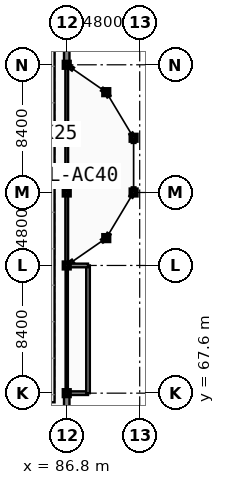
"""IFC4 building model, lengths in metres.
Left out: names, types, materials, properties, quantities, classifications, styles, units other than length and angle.
Written with IfcOpenShell. Run it as: python <this file> out.ifc"""

import sys

from ifc_helpers import new_model, si_unit, direction, frame, frame_2d, origin, origin_2d, place, context, subcontext, project, spatial, rectangle, extrude, element, fill, save


model = new_model("IFC4")
c1 = context("Model", 3, precision=1e-05, world=origin(), true_north=direction((0.0, 1.0)))
c2 = subcontext(c1, "Body", "Model", "MODEL_VIEW")
j1 = project(units=[si_unit("LENGTHUNIT", "METRE"), si_unit("PLANEANGLEUNIT", "RADIAN")], contexts=[c1])
p1 = place(None, origin())
s1 = spatial("IfcSite", under=j1, at=p1, CompositionType="ELEMENT")
p2 = place(p1, origin())
s2 = spatial("IfcBuilding", under=s1, at=p2, CompositionType="ELEMENT")
p3 = place(p2, frame((0.0, 0.0, 13.8)))
s3 = spatial("IfcBuildingStorey", under=s2, at=p3, CompositionType="ELEMENT", Elevation=13.8)
for number, where, z_axis, x_axis in (
    (1, (86.8, 67.6, 0.0), (0.0, 0.0, 1.0), (1.0, 0.0, 0.0)),
    (2, (86.8, 76.0, 0.0), (0.0, 0.0, 1.0), (1.0, 0.0, 0.0)),
    (3, (86.8, 80.8, 0.0), (0.0, 0.0, 1.0), (1.0, 0.0, 0.0)),
    (4, (86.8, 89.2, 0.0), (0.0, 0.0, 1.0), (1.0, 0.0, 0.0)),
    (5, (89.4, 77.8, 0.0), (0.0, 0.0, 1.0), (1.0, 0.0, 0.0)),
    (6, (89.4, 87.4, 0.0), (0.0, 0.0, 1.0), (1.0, 0.0, 0.0)),
    (7, (91.2, 80.8, 0.0), (0.0, 0.0, 1.0), (1.0, 0.0, 0.0)),
    (8, (91.2, 84.4, 0.0), (0.0, 0.0, 1.0), (1.0, 0.0, 0.0)),
):
    element("IfcColumn", number, at=place(p3, frame(where, z_axis=z_axis, x_axis=x_axis)), inside=s3, PredefinedType="COLUMN", context=c2, shape_type="SweptSolid", body=[
        extrude(rectangle(XDim=0.36, YDim=0.36, at=origin_2d()), origin(), (0.0, 0.0, 1.0), 3.9),
    ])
p4 = place(p3, frame((86.8, 67.6, 0.0), z_axis=(0.0, 0.0, 1.0), x_axis=(0.0, 1.0, 0.0)))
e9 = element("IfcWall", 9, at=p4, inside=s3, PredefinedType="PARTITIONING", context=c2, shape_type="SweptSolid", body=[
    extrude(rectangle(XDim=8.4, YDim=0.15, at=frame_2d((4.2, 0.0))), origin(), (0.0, 0.0, 1.0), 3.2),
])
p5 = place(p4, frame((3.7, 0.0, -0.01)))
e10 = element("IfcOpeningElement", 10, at=p5, cuts=e9, PredefinedType="OPENING", context=c2, shape_type="SweptSolid", body=[
    extrude(rectangle(XDim=1.0, YDim=2.16, at=frame_2d((0.5, 1.08))), frame((0.0, 0.085, 0.0), z_axis=(0.0, -1.0, 0.0), x_axis=(1.0, 0.0, 0.0)), (0.0, 0.0, 1.0), 0.17),
])
p6 = place(p3, frame((86.8, 76.0, 0.0), z_axis=(0.0, 0.0, 1.0), x_axis=(0.0, 1.0, 0.0)))
e11 = element("IfcWall", 11, at=p6, inside=s3, PredefinedType="PARTITIONING", context=c2, shape_type="SweptSolid", body=[
    extrude(rectangle(XDim=13.2, YDim=0.18, at=frame_2d((6.6, 0.0))), origin(), (0.0, 0.0, 1.0), 3.2),
])
p7 = place(p6, frame((5.8, 0.0, -0.01)))
e12 = element("IfcOpeningElement", 12, at=p7, cuts=e11, PredefinedType="OPENING", context=c2, shape_type="SweptSolid", body=[
    extrude(rectangle(XDim=1.6, YDim=2.21, at=frame_2d((0.8, 1.105))), frame((0.0, 0.1, 0.0), z_axis=(0.0, -1.0, 0.0), x_axis=(1.0, 0.0, 0.0)), (0.0, 0.0, 1.0), 0.2),
])
p8 = place(p3, frame((86.8, 59.2, 0.0), z_axis=(0.0, 0.0, 1.0), x_axis=(0.0, 1.0, 0.0)))
e13 = element("IfcWall", 13, at=p8, inside=s3, PredefinedType="SOLIDWALL", context=c2, shape_type="SweptSolid", body=[
    extrude(rectangle(XDim=8.4, YDim=0.36, at=frame_2d((4.2, 0.0))), origin(), (0.0, 0.0, 1.0), 3.2),
])
p9 = place(p8, frame((0.46, 0.0, 0.75)))
e14 = element("IfcOpeningElement", 14, at=p9, cuts=e13, PredefinedType="OPENING", context=c2, shape_type="SweptSolid", body=[
    extrude(rectangle(XDim=1.55, YDim=2.31, at=frame_2d((0.775, 1.155))), frame((0.0, 0.19, 0.0), z_axis=(0.0, -1.0, 0.0), x_axis=(1.0, 0.0, 0.0)), (0.0, 0.0, 1.0), 0.38),
])
p10 = place(p8, frame((6.26, 0.0, 0.75)))
e15 = element("IfcOpeningElement", 15, at=p10, cuts=e13, PredefinedType="OPENING", context=c2, shape_type="SweptSolid", body=[
    extrude(rectangle(XDim=1.55, YDim=2.31, at=frame_2d((0.775, 1.155))), frame((0.0, 0.19, 0.0), z_axis=(0.0, -1.0, 0.0), x_axis=(1.0, 0.0, 0.0)), (0.0, 0.0, 1.0), 0.38),
])
p11 = place(p3, frame((86.8, 89.2, 0.0), z_axis=(0.0, 0.0, 1.0), x_axis=(0.0, 1.0, 0.0)))
e16 = element("IfcWall", 16, at=p11, inside=s3, PredefinedType="SOLIDWALL", context=c2, shape_type="SweptSolid", body=[
    extrude(rectangle(XDim=8.4, YDim=0.36, at=frame_2d((4.2, 0.0))), origin(), (0.0, 0.0, 1.0), 3.2),
])
p12 = place(p11, frame((0.46, 0.0, 0.75)))
e17 = element("IfcOpeningElement", 17, at=p12, cuts=e16, PredefinedType="OPENING", context=c2, shape_type="SweptSolid", body=[
    extrude(rectangle(XDim=1.55, YDim=2.31, at=frame_2d((0.775, 1.155))), frame((0.0, 0.19, 0.0), z_axis=(0.0, -1.0, 0.0), x_axis=(1.0, 0.0, 0.0)), (0.0, 0.0, 1.0), 0.38),
])
p13 = place(p11, frame((6.26, 0.0, 0.75)))
e18 = element("IfcOpeningElement", 18, at=p13, cuts=e16, PredefinedType="OPENING", context=c2, shape_type="SweptSolid", body=[
    extrude(rectangle(XDim=1.55, YDim=2.31, at=frame_2d((0.775, 1.155))), frame((0.0, 0.19, 0.0), z_axis=(0.0, -1.0, 0.0), x_axis=(1.0, 0.0, 0.0)), (0.0, 0.0, 1.0), 0.38),
])
p14 = place(p3, frame((87.03, 76.159, 0.0), z_axis=(0.0, 0.0, 1.0), x_axis=(0.822192191644, 0.56920997883, 0.0)))
e19 = element("IfcWall", 19, at=p14, inside=s3, PredefinedType="SOLIDWALL", context=c2, shape_type="SweptSolid", body=[
    extrude(rectangle(XDim=0.22, YDim=0.24, at=frame_2d((0.11, 0.0))), origin(), (0.0, 0.0, 1.0), 3.2),
])
p15 = place(p3, frame((89.121, 77.606, 0.0), z_axis=(0.0, 0.0, 1.0), x_axis=(0.821855834467, 0.569695521619, 0.0)))
e20 = element("IfcWall", 20, at=p15, inside=s3, PredefinedType="SOLIDWALL", context=c2, shape_type="SweptSolid", body=[
    extrude(rectangle(XDim=0.34, YDim=0.24, at=frame_2d((0.17, 0.0))), origin(), (0.0, 0.0, 1.0), 3.2),
])
p16 = place(p3, frame((89.4, 77.8, 0.0), z_axis=(0.0, 0.0, 1.0), x_axis=(0.514812489021, 0.857302805984, 0.0)))
e21 = element("IfcWall", 21, at=p16, inside=s3, PredefinedType="SOLIDWALL", context=c2, shape_type="SweptSolid", body=[
    extrude(rectangle(XDim=0.34, YDim=0.24, at=frame_2d((0.17, 0.0))), origin(), (0.0, 0.0, 1.0), 3.2),
])
for number, where, z_axis, x_axis in (
    (22, (91.025, 80.509, 0.0), (0.0, 0.0, 1.0), (0.514, 0.858, 0.0)),
    (23, (91.2, 80.8, 0.0), (0.0, 0.0, 1.0), (0.0, 1.0, 0.0)),
    (24, (91.2, 84.06, 0.0), (0.0, 0.0, 1.0), (0.0, 1.0, 0.0)),
    (25, (91.2, 84.4, 0.0), (0.0, 0.0, 1.0), (-0.514, 0.858, 0.0)),
):
    element("IfcWall", number, at=place(p3, frame(where, z_axis=z_axis, x_axis=x_axis)), inside=s3, PredefinedType="SOLIDWALL", context=c2, shape_type="SweptSolid", body=[
        extrude(rectangle(XDim=0.34, YDim=0.24, at=frame_2d((0.17, 0.0))), origin(), (0.0, 0.0, 1.0), 3.2),
    ])
p17 = place(p3, frame((89.575, 87.108, 0.0), z_axis=(0.0, 0.0, 1.0), x_axis=(-0.514812489021, 0.857302805984, 0.0)))
e26 = element("IfcWall", 26, at=p17, inside=s3, PredefinedType="SOLIDWALL", context=c2, shape_type="SweptSolid", body=[
    extrude(rectangle(XDim=0.34, YDim=0.24, at=frame_2d((0.17, 0.0))), origin(), (0.0, 0.0, 1.0), 3.2),
])
p18 = place(p3, frame((89.4, 87.4, 0.0), z_axis=(0.0, 0.0, 1.0), x_axis=(-0.821855834467, 0.569695521619, 0.0)))
e27 = element("IfcWall", 27, at=p18, inside=s3, PredefinedType="SOLIDWALL", context=c2, shape_type="SweptSolid", body=[
    extrude(rectangle(XDim=0.34, YDim=0.24, at=frame_2d((0.17, 0.0))), origin(), (0.0, 0.0, 1.0), 3.2),
])
p19 = place(p3, frame((87.211, 88.915, 0.0), z_axis=(0.0, 0.0, 1.0), x_axis=(-0.822192191644, 0.56920997883, 0.0)))
e28 = element("IfcWall", 28, at=p19, inside=s3, PredefinedType="SOLIDWALL", context=c2, shape_type="SweptSolid", body=[
    extrude(rectangle(XDim=0.22, YDim=0.24, at=frame_2d((0.11, 0.0))), origin(), (0.0, 0.0, 1.0), 3.2),
])
p20 = place(p3, frame((86.8, 67.6, 0.0), z_axis=(0.0, 0.0, 1.0), x_axis=(1.0, 0.0, 0.0)))
e29 = element("IfcWall", 29, at=p20, inside=s3, PredefinedType="SOLIDWALL", context=c2, shape_type="SweptSolid", body=[
    extrude(rectangle(XDim=1.4, YDim=0.24, at=frame_2d((0.7, 0.0))), origin(), (0.0, 0.0, 1.0), 3.2),
])
p21 = place(p3, frame((88.2, 67.6, 0.0), z_axis=(0.0, 0.0, 1.0), x_axis=(0.0, 1.0, 0.0)))
e30 = element("IfcWall", 30, at=p21, inside=s3, PredefinedType="SOLIDWALL", context=c2, shape_type="SweptSolid", body=[
    extrude(rectangle(XDim=8.4, YDim=0.24, at=frame_2d((4.2, 0.0))), origin(), (0.0, 0.0, 1.0), 3.2),
])
p22 = place(p21, frame((0.46, 0.0, 0.65)))
e31 = element("IfcOpeningElement", 31, at=p22, cuts=e30, PredefinedType="OPENING", context=c2, shape_type="SweptSolid", body=[
    extrude(rectangle(XDim=2.4, YDim=2.15, at=frame_2d((1.2, 1.075))), frame((0.0, 0.13, 0.0), z_axis=(0.0, -1.0, 0.0), x_axis=(1.0, 0.0, 0.0)), (0.0, 0.0, 1.0), 0.26),
])
p23 = place(p21, frame((5.46, 0.0, 0.65)))
e32 = element("IfcOpeningElement", 32, at=p23, cuts=e30, PredefinedType="OPENING", context=c2, shape_type="SweptSolid", body=[
    extrude(rectangle(XDim=2.4, YDim=2.15, at=frame_2d((1.2, 1.075))), frame((0.0, 0.13, 0.0), z_axis=(0.0, -1.0, 0.0), x_axis=(1.0, 0.0, 0.0)), (0.0, 0.0, 1.0), 0.26),
])
p24 = place(p3, frame((88.2, 76.0, 0.0), z_axis=(0.0, 0.0, 1.0), x_axis=(-1.0, 0.0, 0.0)))
e33 = element("IfcWall", 33, at=p24, inside=s3, PredefinedType="SOLIDWALL", context=c2, shape_type="SweptSolid", body=[
    extrude(rectangle(XDim=1.4, YDim=0.24, at=frame_2d((0.7, 0.0))), origin(), (0.0, 0.0, 1.0), 3.2),
])
p25 = place(p5, frame((0.0, 0.0, 0.01)))
e34 = element("IfcDoor", 34, at=p25, inside=s3, OperationType="SINGLE_SWING_RIGHT", PredefinedType="DOOR", context=c2, shape_type="SweptSolid", body=[
    extrude(rectangle(XDim=1.0, YDim=2.15, at=frame_2d((0.5, 1.075))), frame((0.0, 0.025, 0.0), z_axis=(0.0, -1.0, 0.0), x_axis=(1.0, 0.0, 0.0)), (0.0, 0.0, 1.0), 0.05),
])
fill(e10, e34)
p26 = place(p7, frame((0.0, 0.0, 0.01)))
e35 = element("IfcDoor", 35, at=p26, inside=s3, OperationType="DOUBLE_SWING_LEFT", PredefinedType="DOOR", context=c2, shape_type="SweptSolid", body=[
    extrude(rectangle(XDim=1.6, YDim=2.2, at=frame_2d((0.8, 1.1))), frame((0.0, 0.025, 0.0), z_axis=(0.0, -1.0, 0.0), x_axis=(1.0, 0.0, 0.0)), (0.0, 0.0, 1.0), 0.05),
])
fill(e12, e35)
p27 = place(p10, origin())
e36 = element("IfcWindow", 36, at=p27, inside=s3, PartitioningType="DOUBLE_PANEL_HORIZONTAL", PredefinedType="WINDOW", context=c2, shape_type="SweptSolid", body=[
    extrude(rectangle(XDim=1.55, YDim=2.31, at=frame_2d((0.775, 1.155))), frame((0.0, 0.03, 0.0), z_axis=(0.0, -1.0, 0.0), x_axis=(1.0, 0.0, 0.0)), (0.0, 0.0, 1.0), 0.06),
])
fill(e15, e36)
p28 = place(p12, origin())
e37 = element("IfcWindow", 37, at=p28, inside=s3, PartitioningType="DOUBLE_PANEL_HORIZONTAL", PredefinedType="WINDOW", context=c2, shape_type="SweptSolid", body=[
    extrude(rectangle(XDim=1.55, YDim=2.31, at=frame_2d((0.775, 1.155))), frame((0.0, 0.03, 0.0), z_axis=(0.0, -1.0, 0.0), x_axis=(1.0, 0.0, 0.0)), (0.0, 0.0, 1.0), 0.06),
])
fill(e17, e37)
p29 = place(p22, origin())
e38 = element("IfcWindow", 38, at=p29, inside=s3, PartitioningType="TRIPLE_PANEL_VERTICAL", PredefinedType="WINDOW", context=c2, shape_type="SweptSolid", body=[
    extrude(rectangle(XDim=2.4, YDim=2.15, at=frame_2d((1.2, 1.075))), frame((0.0, 0.03, 0.0), z_axis=(0.0, -1.0, 0.0), x_axis=(1.0, 0.0, 0.0)), (0.0, 0.0, 1.0), 0.06),
])
fill(e31, e38)
p30 = place(p23, origin())
e39 = element("IfcWindow", 39, at=p30, inside=s3, PartitioningType="TRIPLE_PANEL_VERTICAL", PredefinedType="WINDOW", context=c2, shape_type="SweptSolid", body=[
    extrude(rectangle(XDim=2.4, YDim=2.15, at=frame_2d((1.2, 1.075))), frame((0.0, 0.03, 0.0), z_axis=(0.0, -1.0, 0.0), x_axis=(1.0, 0.0, 0.0)), (0.0, 0.0, 1.0), 0.06),
])
fill(e32, e39)
save(model, sys.argv[1])
